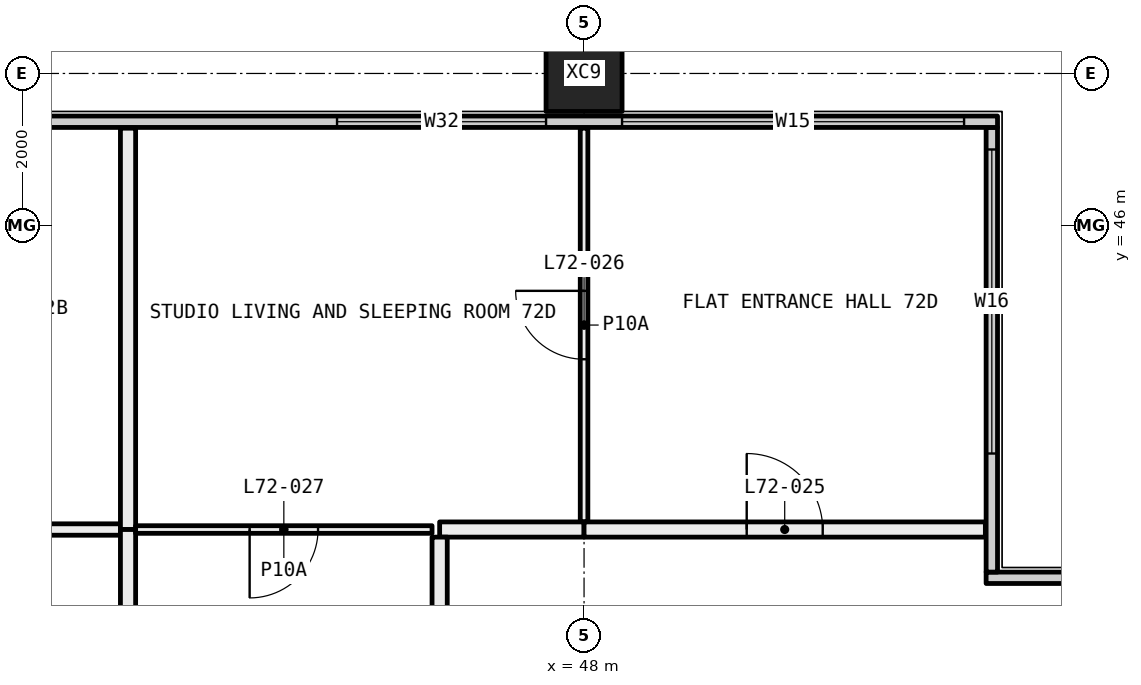
"""IFC4 building model, lengths in metres.
Left out: names, types, materials, properties, quantities, classifications, styles, units other than length and angle.
Written with IfcOpenShell. Run it as: python <this file> out.ifc"""

import sys

from ifc_helpers import new_model, si_unit, direction, frame, frame_2d, origin, origin_2d, place, context, subcontext, project, spatial, rectangle, hollow_rectangle, extrude, element, fill, save


model = new_model("IFC4")
c1 = context("Model", 3, precision=1e-05, world=origin(), true_north=direction((0.0, 1.0)))
c2 = subcontext(c1, "Body", "Model", "MODEL_VIEW")
j1 = project(units=[si_unit("LENGTHUNIT", "METRE"), si_unit("PLANEANGLEUNIT", "RADIAN")], contexts=[c1])
p1 = place(None, origin())
s1 = spatial("IfcSite", under=j1, at=p1, CompositionType="ELEMENT")
p2 = place(p1, origin())
s2 = spatial("IfcBuilding", under=s1, at=p2, CompositionType="ELEMENT")
p3 = place(p2, frame((0.0, 0.0, 266.25)))
s3 = spatial("IfcBuildingStorey", under=s2, at=p3, CompositionType="ELEMENT", Elevation=266.25)
p4 = place(p3, frame((48.0, 48.0, -0.4), z_axis=(0.0, 0.0, 1.0), x_axis=(1.0, 0.0, 0.0)))
e1 = element("IfcColumn", 1, at=p4, inside=s3, PredefinedType="COLUMN", context=c2, shape_type="SweptSolid", body=[
    extrude(hollow_rectangle(XDim=1.0, YDim=1.0, WallThickness=0.036, at=origin_2d()), origin(), (0.0, 0.0, 1.0), 3.45),
])
p5 = place(p3, frame((53.29, 41.365, 0.0), z_axis=(0.0, 0.0, 1.0), x_axis=(1.0, 0.0, 0.0)))
e2 = element("IfcWall", 2, at=p5, inside=s3, PredefinedType="ELEMENTEDWALL", context=c2, shape_type="SweptSolid", body=[
    extrude(rectangle(XDim=6.15, YDim=0.15, at=frame_2d((3.075, 0.0))), origin(), (0.0, 0.0, 1.0), 3.05),
])
p6 = place(p5, frame((1.71, 0.0, 0.45)))
e3 = element("IfcOpeningElement", 3, at=p6, cuts=e2, PredefinedType="OPENING", context=c2, shape_type="SweptSolid", body=[
    extrude(rectangle(XDim=4.0, YDim=2.55, at=frame_2d((2.0, 1.275))), frame((0.0, 0.085, 0.0), z_axis=(0.0, -1.0, 0.0), x_axis=(1.0, 0.0, 0.0)), (0.0, 0.0, 1.0), 0.17),
])
p7 = place(p3, frame((53.365, 41.44, 0.0), z_axis=(0.0, 0.0, 1.0), x_axis=(0.0, 1.0, 0.0)))
e4 = element("IfcWall", 4, at=p7, inside=s3, PredefinedType="ELEMENTEDWALL", context=c2, shape_type="SweptSolid", body=[
    extrude(rectangle(XDim=5.85, YDim=0.15, at=frame_2d((2.925, 0.0))), origin(), (0.0, 0.0, 1.0), 3.05),
])
p8 = place(p7, frame((1.56, 0.0, 0.45)))
e5 = element("IfcOpeningElement", 5, at=p8, cuts=e4, PredefinedType="OPENING", context=c2, shape_type="SweptSolid", body=[
    extrude(rectangle(XDim=4.0, YDim=2.55, at=frame_2d((2.0, 1.275))), frame((0.0, 0.085, 0.0), z_axis=(0.0, -1.0, 0.0), x_axis=(1.0, 0.0, 0.0)), (0.0, 0.0, 1.0), 0.17),
])
p9 = place(p3, frame((18.56, 47.365, 0.0), z_axis=(0.0, 0.0, 1.0), x_axis=(1.0, 0.0, 0.0)))
e6 = element("IfcWall", 6, at=p9, inside=s3, PredefinedType="ELEMENTEDWALL", context=c2, shape_type="SweptSolid", body=[
    extrude(rectangle(XDim=34.88, YDim=0.15, at=frame_2d((17.44, 0.0))), origin(), (0.0, 0.0, 1.0), 3.05),
])
p10 = place(p9, frame((0.44, 0.0, 0.45)))
e7 = element("IfcOpeningElement", 7, at=p10, cuts=e6, PredefinedType="OPENING", context=c2, shape_type="SweptSolid", body=[
    extrude(rectangle(XDim=4.5, YDim=2.55, at=frame_2d((2.25, 1.275))), frame((0.0, 0.085, 0.0), z_axis=(0.0, -1.0, 0.0), x_axis=(1.0, 0.0, 0.0)), (0.0, 0.0, 1.0), 0.17),
])
p11 = place(p9, frame((5.94, 0.0, 0.45)))
e8 = element("IfcOpeningElement", 8, at=p11, cuts=e6, PredefinedType="OPENING", context=c2, shape_type="SweptSolid", body=[
    extrude(rectangle(XDim=2.75, YDim=2.55, at=frame_2d((1.375, 1.275))), frame((0.0, 0.085, 0.0), z_axis=(0.0, -1.0, 0.0), x_axis=(1.0, 0.0, 0.0)), (0.0, 0.0, 1.0), 0.17),
])
p12 = place(p9, frame((14.94, 0.0, 0.45)))
e9 = element("IfcOpeningElement", 9, at=p12, cuts=e6, PredefinedType="OPENING", context=c2, shape_type="SweptSolid", body=[
    extrude(rectangle(XDim=2.0, YDim=2.55, at=frame_2d((1.0, 1.275))), frame((0.0, 0.085, 0.0), z_axis=(0.0, -1.0, 0.0), x_axis=(1.0, 0.0, 0.0)), (0.0, 0.0, 1.0), 0.17),
])
p13 = place(p9, frame((17.94, 0.0, 0.45)))
e10 = element("IfcOpeningElement", 10, at=p13, cuts=e6, PredefinedType="OPENING", context=c2, shape_type="SweptSolid", body=[
    extrude(rectangle(XDim=2.75, YDim=2.55, at=frame_2d((1.375, 1.275))), frame((0.0, 0.085, 0.0), z_axis=(0.0, -1.0, 0.0), x_axis=(1.0, 0.0, 0.0)), (0.0, 0.0, 1.0), 0.17),
])
p14 = place(p9, frame((26.19, 0.0, 0.45)))
e11 = element("IfcOpeningElement", 11, at=p14, cuts=e6, PredefinedType="OPENING", context=c2, shape_type="SweptSolid", body=[
    extrude(rectangle(XDim=2.75, YDim=2.55, at=frame_2d((1.375, 1.275))), frame((0.0, 0.085, 0.0), z_axis=(0.0, -1.0, 0.0), x_axis=(1.0, 0.0, 0.0)), (0.0, 0.0, 1.0), 0.17),
])
p15 = place(p9, frame((29.94, 0.0, 0.45)))
e12 = element("IfcOpeningElement", 12, at=p15, cuts=e6, PredefinedType="OPENING", context=c2, shape_type="SweptSolid", body=[
    extrude(rectangle(XDim=4.5, YDim=2.55, at=frame_2d((2.25, 1.275))), frame((0.0, 0.085, 0.0), z_axis=(0.0, -1.0, 0.0), x_axis=(1.0, 0.0, 0.0)), (0.0, 0.0, 1.0), 0.17),
])
p16 = place(p3, frame((36.0, 42.0, 0.0), z_axis=(0.0, 0.0, 1.0), x_axis=(1.0, 0.0, 0.0)))
e13 = element("IfcWall", 13, at=p16, inside=s3, PredefinedType="PARTITIONING", context=c2, shape_type="SweptSolid", body=[
    extrude(rectangle(XDim=5.9, YDim=0.15, at=frame_2d((2.95, 0.0))), origin(), (0.0, 0.0, 1.0), 2.45),
])
p17 = place(p16, frame((2.5, 0.0, 0.0)))
e14 = element("IfcOpeningElement", 14, at=p17, cuts=e13, PredefinedType="OPENING", context=c2, shape_type="SweptSolid", body=[
    extrude(rectangle(XDim=0.9, YDim=2.1, at=frame_2d((0.45, 1.05))), frame((0.0, 0.085, 0.0), z_axis=(0.0, -1.0, 0.0), x_axis=(1.0, 0.0, 0.0)), (0.0, 0.0, 1.0), 0.17),
])
p18 = place(p3, frame((42.0, 42.0, 0.0), z_axis=(0.0, 0.0, 1.0), x_axis=(0.0, 1.0, 0.0)))
e15 = element("IfcWall", 15, at=p18, inside=s3, PredefinedType="PARTITIONING", context=c2, shape_type="SweptSolid", body=[
    extrude(rectangle(XDim=5.28, YDim=0.2, at=frame_2d((2.64, 0.0))), origin(), (0.0, 0.0, 1.0), 3.05),
])
p19 = place(p3, frame((42.0, 38.1, 0.0), z_axis=(0.0, 0.0, 1.0), x_axis=(0.0, 1.0, 0.0)))
e16 = element("IfcWall", 16, at=p19, inside=s3, PredefinedType="PARTITIONING", context=c2, shape_type="SweptSolid", body=[
    extrude(rectangle(XDim=3.9, YDim=0.2, at=frame_2d((1.95, 0.0))), origin(), (0.0, 0.0, 1.0), 3.05),
])
p20 = place(p3, frame((48.0, 42.1, 0.0), z_axis=(0.0, 0.0, 1.0), x_axis=(0.0, 1.0, 0.0)))
e17 = element("IfcWall", 17, at=p20, inside=s3, PredefinedType="PARTITIONING", context=c2, shape_type="SweptSolid", body=[
    extrude(rectangle(XDim=5.18, YDim=0.1, at=frame_2d((2.59, 0.0))), origin(), (0.0, 0.0, 1.0), 3.05),
])
p21 = place(p20, frame((2.14, 0.0, 0.0)))
e18 = element("IfcOpeningElement", 18, at=p21, cuts=e17, PredefinedType="OPENING", context=c2, shape_type="SweptSolid", body=[
    extrude(rectangle(XDim=0.9, YDim=2.1, at=frame_2d((0.45, 1.05))), frame((0.0, 0.06, 0.0), z_axis=(0.0, -1.0, 0.0), x_axis=(1.0, 0.0, 0.0)), (0.0, 0.0, 1.0), 0.12),
])
p22 = place(p3, frame((42.1, 42.0, 0.0), z_axis=(0.0, 0.0, 1.0), x_axis=(1.0, 0.0, 0.0)))
e19 = element("IfcWall", 19, at=p22, inside=s3, PredefinedType="PARTITIONING", context=c2, shape_type="SweptSolid", body=[
    extrude(rectangle(XDim=3.9, YDim=0.1, at=frame_2d((1.95, 0.0))), origin(), (0.0, 0.0, 1.0), 3.05),
])
p23 = place(p22, frame((1.5, 0.0, 0.0)))
e20 = element("IfcOpeningElement", 20, at=p23, cuts=e19, PredefinedType="OPENING", context=c2, shape_type="SweptSolid", body=[
    extrude(rectangle(XDim=0.9, YDim=2.1, at=frame_2d((0.45, 1.05))), frame((0.0, 0.06, 0.0), z_axis=(0.0, -1.0, 0.0), x_axis=(1.0, 0.0, 0.0)), (0.0, 0.0, 1.0), 0.12),
])
p24 = place(p3, frame((46.1, 42.0, 0.0), z_axis=(0.0, 0.0, 1.0), x_axis=(1.0, 0.0, 0.0)))
e21 = element("IfcWall", 21, at=p24, inside=s3, PredefinedType="PARTITIONING", context=c2, shape_type="SweptSolid", body=[
    extrude(rectangle(XDim=1.9, YDim=0.2, at=frame_2d((0.95, 0.0))), origin(), (0.0, 0.0, 1.0), 3.05),
])
p25 = place(p3, frame((48.0, 42.0, 0.0), z_axis=(0.0, 0.0, 1.0), x_axis=(1.0, 0.0, 0.0)))
e22 = element("IfcWall", 22, at=p25, inside=s3, PredefinedType="PARTITIONING", context=c2, shape_type="SweptSolid", body=[
    extrude(rectangle(XDim=5.28, YDim=0.2, at=frame_2d((2.64, 0.0))), origin(), (0.0, 0.0, 1.0), 3.05),
])
p26 = place(p25, frame((2.14, 0.0, 0.0)))
e23 = element("IfcOpeningElement", 23, at=p26, cuts=e22, PredefinedType="OPENING", context=c2, shape_type="SweptSolid", body=[
    extrude(rectangle(XDim=1.0, YDim=2.1, at=frame_2d((0.5, 1.05))), frame((0.0, 0.11, 0.0), z_axis=(0.0, -1.0, 0.0), x_axis=(1.0, 0.0, 0.0)), (0.0, 0.0, 1.0), 0.22),
])
p27 = place(p3, frame((46.1, 36.1, 0.0), z_axis=(0.0, 0.0, 1.0), x_axis=(0.0, 1.0, 0.0)))
e24 = element("IfcWall", 24, at=p27, inside=s3, PredefinedType="PARTITIONING", context=c2, shape_type="SweptSolid", body=[
    extrude(rectangle(XDim=5.8, YDim=0.2, at=frame_2d((2.9, 0.0))), origin(), (0.0, 0.0, 1.0), 3.05),
])
p28 = place(p8, origin())
e25 = element("IfcWindow", 25, at=p28, inside=s3, PartitioningType="SINGLE_PANEL", PredefinedType="WINDOW", context=c2, shape_type="SweptSolid", body=[
    extrude(rectangle(XDim=4.0, YDim=2.55, at=frame_2d((2.0, 1.275))), frame((0.0, 0.03, 0.0), z_axis=(0.0, -1.0, 0.0), x_axis=(1.0, 0.0, 0.0)), (0.0, 0.0, 1.0), 0.06),
])
fill(e5, e25)
p29 = place(p14, origin())
e26 = element("IfcWindow", 26, at=p29, inside=s3, PartitioningType="SINGLE_PANEL", PredefinedType="WINDOW", context=c2, shape_type="SweptSolid", body=[
    extrude(rectangle(XDim=2.75, YDim=2.55, at=frame_2d((1.375, 1.275))), frame((0.0, 0.03, 0.0), z_axis=(0.0, -1.0, 0.0), x_axis=(1.0, 0.0, 0.0)), (0.0, 0.0, 1.0), 0.06),
])
fill(e11, e26)
p30 = place(p15, origin())
e27 = element("IfcWindow", 27, at=p30, inside=s3, PartitioningType="SINGLE_PANEL", PredefinedType="WINDOW", context=c2, shape_type="SweptSolid", body=[
    extrude(rectangle(XDim=4.5, YDim=2.55, at=frame_2d((2.25, 1.275))), frame((0.0, 0.03, 0.0), z_axis=(0.0, -1.0, 0.0), x_axis=(1.0, 0.0, 0.0)), (0.0, 0.0, 1.0), 0.06),
])
fill(e12, e27)
p31 = place(p26, origin())
e28 = element("IfcDoor", 28, at=p31, inside=s3, OperationType="SINGLE_SWING_RIGHT", PredefinedType="DOOR", context=c2, shape_type="SweptSolid", body=[
    extrude(rectangle(XDim=1.0, YDim=2.1, at=frame_2d((0.5, 1.05))), frame((0.0, 0.025, 0.0), z_axis=(0.0, -1.0, 0.0), x_axis=(1.0, 0.0, 0.0)), (0.0, 0.0, 1.0), 0.05),
])
fill(e23, e28)
p32 = place(p21, origin())
e29 = element("IfcDoor", 29, at=p32, inside=s3, OperationType="SINGLE_SWING_LEFT", PredefinedType="DOOR", context=c2, shape_type="SweptSolid", body=[
    extrude(rectangle(XDim=0.9, YDim=2.1, at=frame_2d((0.45, 1.05))), frame((0.0, 0.025, 0.0), z_axis=(0.0, -1.0, 0.0), x_axis=(1.0, 0.0, 0.0)), (0.0, 0.0, 1.0), 0.05),
])
fill(e18, e29)
p33 = place(p23, frame((0.9, 0.0, 0.0), x_axis=(-1.0, 0.0, 0.0)))
e30 = element("IfcDoor", 30, at=p33, inside=s3, OperationType="SINGLE_SWING_LEFT", PredefinedType="DOOR", context=c2, shape_type="SweptSolid", body=[
    extrude(rectangle(XDim=0.9, YDim=2.1, at=frame_2d((0.45, 1.05))), frame((0.0, 0.025, 0.0), z_axis=(0.0, -1.0, 0.0), x_axis=(1.0, 0.0, 0.0)), (0.0, 0.0, 1.0), 0.05),
])
fill(e20, e30)
save(model, sys.argv[1])
